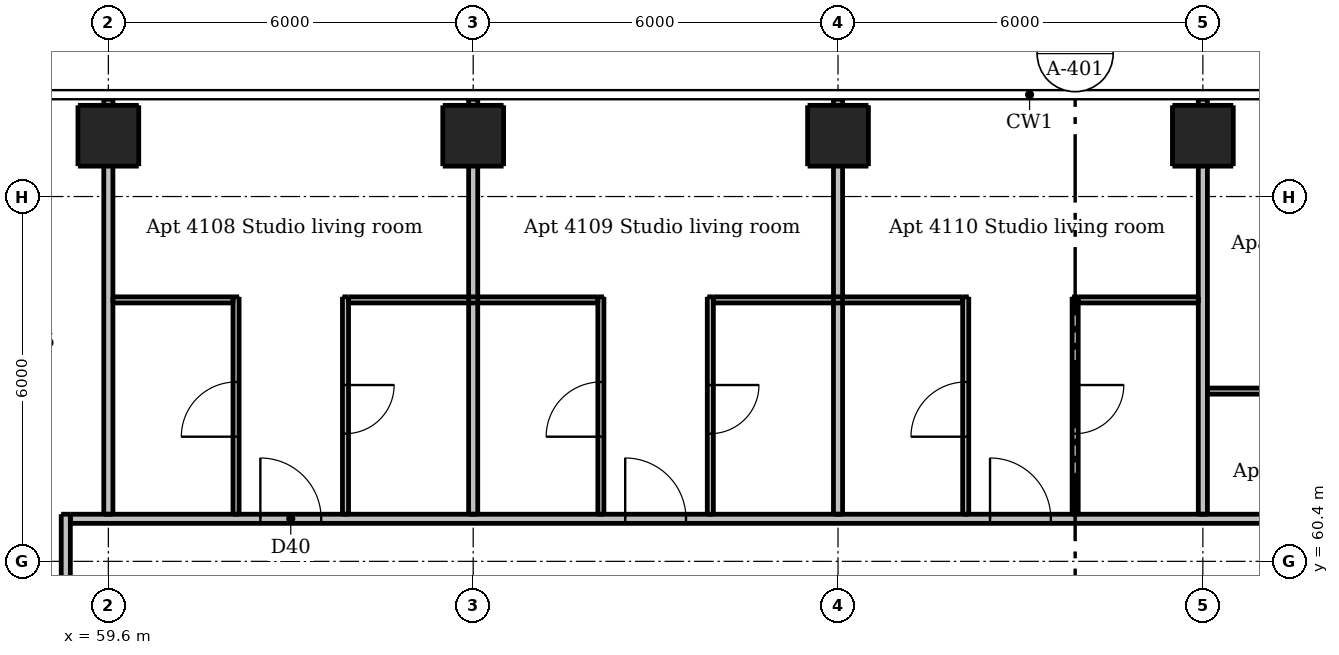
"""IFC4 building model, lengths in metres.
Left out: names, types, materials, properties, quantities, classifications, styles, units other than length and angle.
Written with IfcOpenShell. Run it as: python <this file> out.ifc"""

import sys

from ifc_helpers import new_model, si_unit, direction, frame, frame_2d, origin, origin_2d, place, context, subcontext, project, spatial, rectangle, extrude, element, fill, save


model = new_model("IFC4")
c1 = context("Model", 3, precision=1e-05, world=origin(), true_north=direction((0.0, 1.0)))
c2 = subcontext(c1, "Body", "Model", "MODEL_VIEW")
j1 = project(units=[si_unit("LENGTHUNIT", "METRE"), si_unit("PLANEANGLEUNIT", "RADIAN")], contexts=[c1])
p1 = place(None, origin())
s1 = spatial("IfcSite", under=j1, at=p1, CompositionType="ELEMENT")
p2 = place(p1, origin())
s2 = spatial("IfcBuilding", under=s1, at=p2, CompositionType="ELEMENT")
p3 = place(p2, frame((0.0, 0.0, 154.9)))
s3 = spatial("IfcBuildingStorey", under=s2, at=p3, CompositionType="ELEMENT", Elevation=154.9)
for number, where, z_axis, x_axis in (
    (1, (59.6, 67.4, 0.0), (0.0, 0.0, 1.0), (1.0, 0.0, 0.0)),
    (2, (65.6, 67.4, 0.0), (0.0, 0.0, 1.0), (1.0, 0.0, 0.0)),
    (3, (71.6, 67.4, 0.0), (0.0, 0.0, 1.0), (1.0, 0.0, 0.0)),
    (4, (77.6, 67.4, 0.0), (0.0, 0.0, 1.0), (1.0, 0.0, 0.0)),
):
    element("IfcColumn", number, at=place(p3, frame(where, z_axis=z_axis, x_axis=x_axis)), inside=s3, PredefinedType="COLUMN", context=c2, shape_type="SweptSolid", body=[
        extrude(rectangle(XDim=1.0, YDim=1.0, at=origin_2d()), origin(), (0.0, 0.0, 1.0), 3.05),
    ])
p4 = place(p3, frame((61.7, 61.175, 0.0), z_axis=(0.0, 0.0, 1.0), x_axis=(0.0, 1.0, 0.0)))
e5 = element("IfcWall", 5, at=p4, inside=s3, PredefinedType="PARTITIONING", context=c2, shape_type="SweptSolid", body=[
    extrude(rectangle(XDim=3.575, YDim=0.1, at=frame_2d((1.788, 0.0))), origin(), (0.0, 0.0, 1.0), 3.05),
])
p5 = place(p4, frame((1.275, 0.0, 0.0)))
e6 = element("IfcOpeningElement", 6, at=p5, cuts=e5, PredefinedType="OPENING", context=c2, shape_type="SweptSolid", body=[
    extrude(rectangle(XDim=0.9, YDim=2.1, at=frame_2d((0.45, 1.05))), frame((0.0, 0.06, 0.0), z_axis=(0.0, -1.0, 0.0), x_axis=(1.0, 0.0, 0.0)), (0.0, 0.0, 1.0), 0.12),
])
p6 = place(p3, frame((63.5, 64.75, 0.0), z_axis=(0.0, 0.0, 1.0), x_axis=(0.0, -1.0, 0.0)))
e7 = element("IfcWall", 7, at=p6, inside=s3, PredefinedType="PARTITIONING", context=c2, shape_type="SweptSolid", body=[
    extrude(rectangle(XDim=3.575, YDim=0.1, at=frame_2d((1.788, 0.0))), origin(), (0.0, 0.0, 1.0), 3.05),
])
p7 = place(p6, frame((1.45, 0.0, 0.0)))
e8 = element("IfcOpeningElement", 8, at=p7, cuts=e7, PredefinedType="OPENING", context=c2, shape_type="SweptSolid", body=[
    extrude(rectangle(XDim=0.8, YDim=2.1, at=frame_2d((0.4, 1.05))), frame((0.0, 0.06, 0.0), z_axis=(0.0, -1.0, 0.0), x_axis=(1.0, 0.0, 0.0)), (0.0, 0.0, 1.0), 0.12),
])
p8 = place(p3, frame((67.7, 61.175, 0.0), z_axis=(0.0, 0.0, 1.0), x_axis=(0.0, 1.0, 0.0)))
e9 = element("IfcWall", 9, at=p8, inside=s3, PredefinedType="PARTITIONING", context=c2, shape_type="SweptSolid", body=[
    extrude(rectangle(XDim=3.575, YDim=0.1, at=frame_2d((1.788, 0.0))), origin(), (0.0, 0.0, 1.0), 3.05),
])
p9 = place(p8, frame((1.275, 0.0, 0.0)))
e10 = element("IfcOpeningElement", 10, at=p9, cuts=e9, PredefinedType="OPENING", context=c2, shape_type="SweptSolid", body=[
    extrude(rectangle(XDim=0.9, YDim=2.1, at=frame_2d((0.45, 1.05))), frame((0.0, 0.06, 0.0), z_axis=(0.0, -1.0, 0.0), x_axis=(1.0, 0.0, 0.0)), (0.0, 0.0, 1.0), 0.12),
])
p10 = place(p3, frame((69.5, 64.75, 0.0), z_axis=(0.0, 0.0, 1.0), x_axis=(0.0, -1.0, 0.0)))
e11 = element("IfcWall", 11, at=p10, inside=s3, PredefinedType="PARTITIONING", context=c2, shape_type="SweptSolid", body=[
    extrude(rectangle(XDim=3.575, YDim=0.1, at=frame_2d((1.788, 0.0))), origin(), (0.0, 0.0, 1.0), 3.05),
])
p11 = place(p10, frame((1.45, 0.0, 0.0)))
e12 = element("IfcOpeningElement", 12, at=p11, cuts=e11, PredefinedType="OPENING", context=c2, shape_type="SweptSolid", body=[
    extrude(rectangle(XDim=0.8, YDim=2.1, at=frame_2d((0.4, 1.05))), frame((0.0, 0.06, 0.0), z_axis=(0.0, -1.0, 0.0), x_axis=(1.0, 0.0, 0.0)), (0.0, 0.0, 1.0), 0.12),
])
p12 = place(p3, frame((73.7, 61.175, 0.0), z_axis=(0.0, 0.0, 1.0), x_axis=(0.0, 1.0, 0.0)))
e13 = element("IfcWall", 13, at=p12, inside=s3, PredefinedType="PARTITIONING", context=c2, shape_type="SweptSolid", body=[
    extrude(rectangle(XDim=3.575, YDim=0.1, at=frame_2d((1.788, 0.0))), origin(), (0.0, 0.0, 1.0), 3.05),
])
p13 = place(p12, frame((1.275, 0.0, 0.0)))
e14 = element("IfcOpeningElement", 14, at=p13, cuts=e13, PredefinedType="OPENING", context=c2, shape_type="SweptSolid", body=[
    extrude(rectangle(XDim=0.9, YDim=2.1, at=frame_2d((0.45, 1.05))), frame((0.0, 0.06, 0.0), z_axis=(0.0, -1.0, 0.0), x_axis=(1.0, 0.0, 0.0)), (0.0, 0.0, 1.0), 0.12),
])
p14 = place(p3, frame((75.5, 64.75, 0.0), z_axis=(0.0, 0.0, 1.0), x_axis=(0.0, -1.0, 0.0)))
e15 = element("IfcWall", 15, at=p14, inside=s3, PredefinedType="PARTITIONING", context=c2, shape_type="SweptSolid", body=[
    extrude(rectangle(XDim=3.575, YDim=0.1, at=frame_2d((1.788, 0.0))), origin(), (0.0, 0.0, 1.0), 3.05),
])
p15 = place(p14, frame((1.45, 0.0, 0.0)))
e16 = element("IfcOpeningElement", 16, at=p15, cuts=e15, PredefinedType="OPENING", context=c2, shape_type="SweptSolid", body=[
    extrude(rectangle(XDim=0.8, YDim=2.1, at=frame_2d((0.4, 1.05))), frame((0.0, 0.06, 0.0), z_axis=(0.0, -1.0, 0.0), x_axis=(1.0, 0.0, 0.0)), (0.0, 0.0, 1.0), 0.12),
])
p16 = place(p3, frame((59.675, 64.7, 0.0), z_axis=(0.0, 0.0, 1.0), x_axis=(1.0, 0.0, 0.0)))
e17 = element("IfcWall", 17, at=p16, inside=s3, PredefinedType="PARTITIONING", context=c2, shape_type="SweptSolid", body=[
    extrude(rectangle(XDim=1.975, YDim=0.1, at=frame_2d((0.987, 0.0))), origin(), (0.0, 0.0, 1.0), 3.05),
])
for number, where, z_axis, x_axis in (
    (18, (63.55, 64.7, 0.0), (0.0, 0.0, 1.0), (1.0, 0.0, 0.0)),
    (19, (69.55, 64.7, 0.0), (0.0, 0.0, 1.0), (1.0, 0.0, 0.0)),
):
    element("IfcWall", number, at=place(p3, frame(where, z_axis=z_axis, x_axis=x_axis)), inside=s3, PredefinedType="PARTITIONING", context=c2, shape_type="SweptSolid", body=[
        extrude(rectangle(XDim=4.1, YDim=0.1, at=frame_2d((2.05, 0.0))), origin(), (0.0, 0.0, 1.0), 3.05),
    ])
p17 = place(p3, frame((75.55, 64.7, 0.0), z_axis=(0.0, 0.0, 1.0), x_axis=(1.0, 0.0, 0.0)))
e20 = element("IfcWall", 20, at=p17, inside=s3, PredefinedType="PARTITIONING", context=c2, shape_type="SweptSolid", body=[
    extrude(rectangle(XDim=1.975, YDim=0.1, at=frame_2d((0.987, 0.0))), origin(), (0.0, 0.0, 1.0), 3.05),
])
p18 = place(p3, frame((83.55, 63.2, 0.0), z_axis=(0.0, 0.0, 1.0), x_axis=(-1.0, 0.0, 0.0)))
e21 = element("IfcWall", 21, at=p18, inside=s3, PredefinedType="PARTITIONING", context=c2, shape_type="SweptSolid", body=[
    extrude(rectangle(XDim=5.875, YDim=0.1, at=frame_2d((2.938, 0.0))), origin(), (0.0, 0.0, 1.0), 3.05),
])
p19 = place(p18, frame((3.75, 0.0, 0.0)))
e22 = element("IfcOpeningElement", 22, at=p19, cuts=e21, PredefinedType="OPENING", context=c2, shape_type="SweptSolid", body=[
    extrude(rectangle(XDim=0.8, YDim=2.1, at=frame_2d((0.4, 1.05))), frame((0.0, 0.06, 0.0), z_axis=(0.0, -1.0, 0.0), x_axis=(1.0, 0.0, 0.0)), (0.0, 0.0, 1.0), 0.12),
])
p20 = place(p3, frame((58.9, 30.325, 0.0), z_axis=(0.0, 0.0, 1.0), x_axis=(0.0, 1.0, 0.0)))
e23 = element("IfcWall", 23, at=p20, inside=s3, PredefinedType="PARTITIONING", context=c2, shape_type="SweptSolid", body=[
    extrude(rectangle(XDim=30.85, YDim=0.15, at=frame_2d((15.425, 0.0))), origin(), (0.0, 0.0, 1.0), 3.05),
])
p21 = place(p20, frame((2.575, 0.0, 0.0)))
e24 = element("IfcOpeningElement", 24, at=p21, cuts=e23, PredefinedType="OPENING", context=c2, shape_type="SweptSolid", body=[
    extrude(rectangle(XDim=1.0, YDim=2.1, at=frame_2d((0.5, 1.05))), frame((0.0, 0.085, 0.0), z_axis=(0.0, -1.0, 0.0), x_axis=(1.0, 0.0, 0.0)), (0.0, 0.0, 1.0), 0.17),
])
p22 = place(p20, frame((8.575, 0.0, 0.0)))
e25 = element("IfcOpeningElement", 25, at=p22, cuts=e23, PredefinedType="OPENING", context=c2, shape_type="SweptSolid", body=[
    extrude(rectangle(XDim=1.0, YDim=2.1, at=frame_2d((0.5, 1.05))), frame((0.0, 0.085, 0.0), z_axis=(0.0, -1.0, 0.0), x_axis=(1.0, 0.0, 0.0)), (0.0, 0.0, 1.0), 0.17),
])
p23 = place(p20, frame((14.575, 0.0, 0.0)))
e26 = element("IfcOpeningElement", 26, at=p23, cuts=e23, PredefinedType="OPENING", context=c2, shape_type="SweptSolid", body=[
    extrude(rectangle(XDim=1.0, YDim=2.1, at=frame_2d((0.5, 1.05))), frame((0.0, 0.085, 0.0), z_axis=(0.0, -1.0, 0.0), x_axis=(1.0, 0.0, 0.0)), (0.0, 0.0, 1.0), 0.17),
])
p24 = place(p20, frame((26.925, 0.0, 0.0)))
e27 = element("IfcOpeningElement", 27, at=p24, cuts=e23, PredefinedType="OPENING", context=c2, shape_type="SweptSolid", body=[
    extrude(rectangle(XDim=1.0, YDim=2.1, at=frame_2d((0.5, 1.05))), frame((0.0, 0.085, 0.0), z_axis=(0.0, -1.0, 0.0), x_axis=(1.0, 0.0, 0.0)), (0.0, 0.0, 1.0), 0.17),
])
p25 = place(p3, frame((59.6, 61.175, 0.0), z_axis=(0.0, 0.0, 1.0), x_axis=(0.0, 1.0, 0.0)))
e28 = element("IfcWall", 28, at=p25, inside=s3, PredefinedType="PARTITIONING", context=c2, shape_type="SweptSolid", body=[
    extrude(rectangle(XDim=6.825, YDim=0.15, at=frame_2d((3.413, 0.0))), origin(), (0.0, 0.0, 1.0), 2.51),
])
for number, where, z_axis, x_axis in (
    (29, (65.6, 61.175, 0.0), (0.0, 0.0, 1.0), (0.0, 1.0, 0.0)),
    (30, (71.6, 61.175, 0.0), (0.0, 0.0, 1.0), (0.0, 1.0, 0.0)),
    (31, (77.6, 61.175, 0.0), (0.0, 0.0, 1.0), (0.0, 1.0, 0.0)),
):
    element("IfcWall", number, at=place(p3, frame(where, z_axis=z_axis, x_axis=x_axis)), inside=s3, PredefinedType="PARTITIONING", context=c2, shape_type="SweptSolid", body=[
        extrude(rectangle(XDim=6.825, YDim=0.15, at=frame_2d((3.413, 0.0))), origin(), (0.0, 0.0, 1.0), 2.516),
    ])
p26 = place(p3, frame((58.975, 61.1, 0.0), z_axis=(0.0, 0.0, 1.0), x_axis=(1.0, 0.0, 0.0)))
e32 = element("IfcWall", 32, at=p26, inside=s3, PredefinedType="PARTITIONING", context=c2, shape_type="SweptSolid", body=[
    extrude(rectangle(XDim=29.25, YDim=0.15, at=frame_2d((14.625, 0.0))), origin(), (0.0, 0.0, 1.0), 3.05),
])
p27 = place(p26, frame((3.125, 0.0, 0.0)))
e33 = element("IfcOpeningElement", 33, at=p27, cuts=e32, PredefinedType="OPENING", context=c2, shape_type="SweptSolid", body=[
    extrude(rectangle(XDim=1.0, YDim=2.1, at=frame_2d((0.5, 1.05))), frame((0.0, 0.085, 0.0), z_axis=(0.0, -1.0, 0.0), x_axis=(1.0, 0.0, 0.0)), (0.0, 0.0, 1.0), 0.17),
])
p28 = place(p26, frame((9.125, 0.0, 0.0)))
e34 = element("IfcOpeningElement", 34, at=p28, cuts=e32, PredefinedType="OPENING", context=c2, shape_type="SweptSolid", body=[
    extrude(rectangle(XDim=1.0, YDim=2.1, at=frame_2d((0.5, 1.05))), frame((0.0, 0.085, 0.0), z_axis=(0.0, -1.0, 0.0), x_axis=(1.0, 0.0, 0.0)), (0.0, 0.0, 1.0), 0.17),
])
p29 = place(p26, frame((15.125, 0.0, 0.0)))
e35 = element("IfcOpeningElement", 35, at=p29, cuts=e32, PredefinedType="OPENING", context=c2, shape_type="SweptSolid", body=[
    extrude(rectangle(XDim=1.0, YDim=2.1, at=frame_2d((0.5, 1.05))), frame((0.0, 0.085, 0.0), z_axis=(0.0, -1.0, 0.0), x_axis=(1.0, 0.0, 0.0)), (0.0, 0.0, 1.0), 0.17),
])
p30 = place(p26, frame((26.475, 0.0, 0.0)))
e36 = element("IfcOpeningElement", 36, at=p30, cuts=e32, PredefinedType="OPENING", context=c2, shape_type="SweptSolid", body=[
    extrude(rectangle(XDim=1.0, YDim=2.1, at=frame_2d((0.5, 1.05))), frame((0.0, 0.085, 0.0), z_axis=(0.0, -1.0, 0.0), x_axis=(1.0, 0.0, 0.0)), (0.0, 0.0, 1.0), 0.17),
])
p31 = place(p27, origin())
e37 = element("IfcDoor", 37, at=p31, inside=s3, OperationType="SINGLE_SWING_LEFT", PredefinedType="DOOR", context=c2, shape_type="SweptSolid", body=[
    extrude(rectangle(XDim=1.0, YDim=2.1, at=frame_2d((0.5, 1.05))), frame((0.0, 0.025, 0.0), z_axis=(0.0, -1.0, 0.0), x_axis=(1.0, 0.0, 0.0)), (0.0, 0.0, 1.0), 0.05),
])
fill(e33, e37)
p32 = place(p5, origin())
e38 = element("IfcDoor", 38, at=p32, inside=s3, OperationType="SINGLE_SWING_LEFT", PredefinedType="DOOR", context=c2, shape_type="SweptSolid", body=[
    extrude(rectangle(XDim=0.9, YDim=2.1, at=frame_2d((0.45, 1.05))), frame((0.0, 0.025, 0.0), z_axis=(0.0, -1.0, 0.0), x_axis=(1.0, 0.0, 0.0)), (0.0, 0.0, 1.0), 0.05),
])
fill(e6, e38)
p33 = place(p7, origin())
e39 = element("IfcDoor", 39, at=p33, inside=s3, OperationType="SINGLE_SWING_LEFT", PredefinedType="DOOR", context=c2, shape_type="SweptSolid", body=[
    extrude(rectangle(XDim=0.8, YDim=2.1, at=frame_2d((0.4, 1.05))), frame((0.0, 0.025, 0.0), z_axis=(0.0, -1.0, 0.0), x_axis=(1.0, 0.0, 0.0)), (0.0, 0.0, 1.0), 0.05),
])
fill(e8, e39)
p34 = place(p28, origin())
e40 = element("IfcDoor", 40, at=p34, inside=s3, OperationType="SINGLE_SWING_LEFT", PredefinedType="DOOR", context=c2, shape_type="SweptSolid", body=[
    extrude(rectangle(XDim=1.0, YDim=2.1, at=frame_2d((0.5, 1.05))), frame((0.0, 0.025, 0.0), z_axis=(0.0, -1.0, 0.0), x_axis=(1.0, 0.0, 0.0)), (0.0, 0.0, 1.0), 0.05),
])
fill(e34, e40)
p35 = place(p9, origin())
e41 = element("IfcDoor", 41, at=p35, inside=s3, OperationType="SINGLE_SWING_LEFT", PredefinedType="DOOR", context=c2, shape_type="SweptSolid", body=[
    extrude(rectangle(XDim=0.9, YDim=2.1, at=frame_2d((0.45, 1.05))), frame((0.0, 0.025, 0.0), z_axis=(0.0, -1.0, 0.0), x_axis=(1.0, 0.0, 0.0)), (0.0, 0.0, 1.0), 0.05),
])
fill(e10, e41)
p36 = place(p11, origin())
e42 = element("IfcDoor", 42, at=p36, inside=s3, OperationType="SINGLE_SWING_LEFT", PredefinedType="DOOR", context=c2, shape_type="SweptSolid", body=[
    extrude(rectangle(XDim=0.8, YDim=2.1, at=frame_2d((0.4, 1.05))), frame((0.0, 0.025, 0.0), z_axis=(0.0, -1.0, 0.0), x_axis=(1.0, 0.0, 0.0)), (0.0, 0.0, 1.0), 0.05),
])
fill(e12, e42)
p37 = place(p29, origin())
e43 = element("IfcDoor", 43, at=p37, inside=s3, OperationType="SINGLE_SWING_LEFT", PredefinedType="DOOR", context=c2, shape_type="SweptSolid", body=[
    extrude(rectangle(XDim=1.0, YDim=2.1, at=frame_2d((0.5, 1.05))), frame((0.0, 0.025, 0.0), z_axis=(0.0, -1.0, 0.0), x_axis=(1.0, 0.0, 0.0)), (0.0, 0.0, 1.0), 0.05),
])
fill(e35, e43)
p38 = place(p13, origin())
e44 = element("IfcDoor", 44, at=p38, inside=s3, OperationType="SINGLE_SWING_LEFT", PredefinedType="DOOR", context=c2, shape_type="SweptSolid", body=[
    extrude(rectangle(XDim=0.9, YDim=2.1, at=frame_2d((0.45, 1.05))), frame((0.0, 0.025, 0.0), z_axis=(0.0, -1.0, 0.0), x_axis=(1.0, 0.0, 0.0)), (0.0, 0.0, 1.0), 0.05),
])
fill(e14, e44)
p39 = place(p15, origin())
e45 = element("IfcDoor", 45, at=p39, inside=s3, OperationType="SINGLE_SWING_LEFT", PredefinedType="DOOR", context=c2, shape_type="SweptSolid", body=[
    extrude(rectangle(XDim=0.8, YDim=2.1, at=frame_2d((0.4, 1.05))), frame((0.0, 0.025, 0.0), z_axis=(0.0, -1.0, 0.0), x_axis=(1.0, 0.0, 0.0)), (0.0, 0.0, 1.0), 0.05),
])
fill(e16, e45)
save(model, sys.argv[1])
